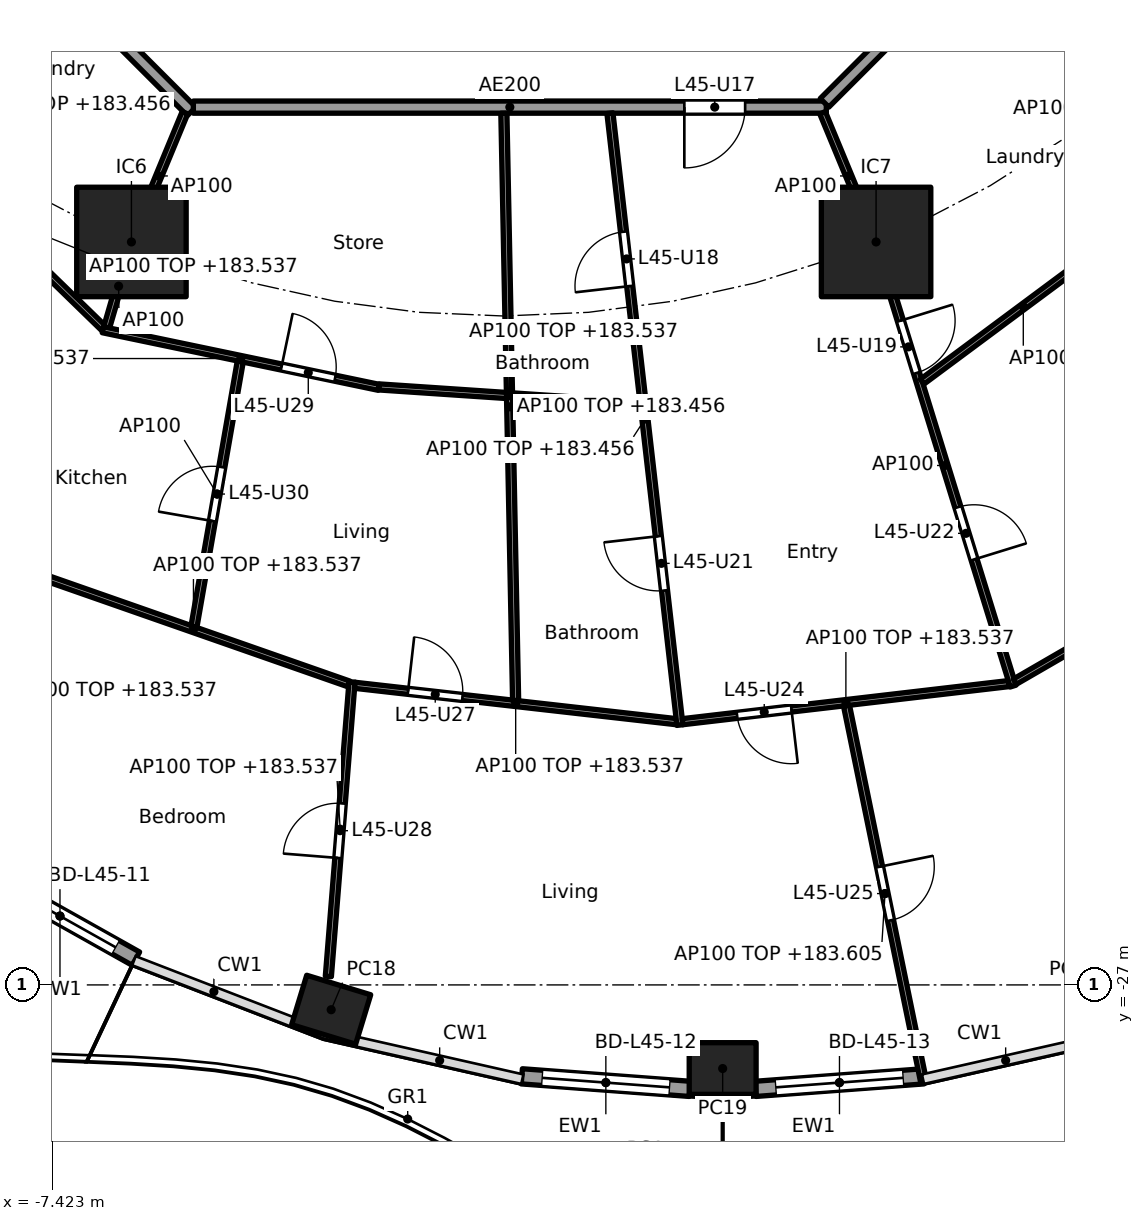
"""IFC4 building model, lengths in metres.
Left out: names, types, materials, properties, quantities, classifications, styles, units other than length and angle.
Written with IfcOpenShell. Run it as: python <this file> out.ifc"""

import sys

from ifc_helpers import new_model, si_unit, direction, frame, frame_2d, origin, origin_2d, place, context, subcontext, project, spatial, rectangle, hollow_rectangle, extrude, element, fill, save


model = new_model("IFC4")
c1 = context("Model", 3, precision=1e-05, world=origin(), true_north=direction((0.0, 1.0)))
c2 = subcontext(c1, "Body", "Model", "MODEL_VIEW")
j1 = project(units=[si_unit("LENGTHUNIT", "METRE"), si_unit("PLANEANGLEUNIT", "RADIAN")], contexts=[c1])
p1 = place(None, origin())
s1 = spatial("IfcSite", under=j1, at=p1, CompositionType="ELEMENT")
p2 = place(p1, origin())
s2 = spatial("IfcBuilding", under=s1, at=p2, CompositionType="ELEMENT")
p3 = place(p2, frame((0.0, 0.0, 180.7)))
s3 = spatial("IfcBuildingStorey", under=s2, at=p3, CompositionType="ELEMENT", Elevation=180.7)
for number, where, z_axis, x_axis in (
    (1, (-2.838, -27.408, 0.0), (0.0, 0.0, 1.0), (0.957, -0.292, 0.0)),
    (2, (3.6, -28.375, 0.0), (0.0, 0.0, 1.0), (1.0, 0.0, 0.0)),
):
    element("IfcColumn", number, at=place(p3, frame(where, z_axis=z_axis, x_axis=x_axis)), inside=s3, PredefinedType="COLUMN", context=c2, shape_type="SweptSolid", body=[
        extrude(hollow_rectangle(XDim=1.1, YDim=0.85, WallThickness=0.036, at=origin_2d()), origin(), (0.0, 0.0, 1.0), 3.7),
    ])
for number, where, z_axis, x_axis in (
    (3, (-6.123, -14.782, 0.0), (0.0, 0.0, 1.0), (1.0, 0.0, 0.0)),
    (4, (6.123, -14.782, 0.0), (0.0, 0.0, 1.0), (1.0, 0.0, 0.0)),
):
    element("IfcColumn", number, at=place(p3, frame(where, z_axis=z_axis, x_axis=x_axis)), inside=s3, PredefinedType="COLUMN", context=c2, shape_type="SweptSolid", body=[
        extrude(rectangle(XDim=1.8, YDim=1.8, at=origin_2d()), origin(), (0.0, 0.0, 1.0), 3.7),
    ])
p4 = place(p3, frame((-6.049, -26.568, 0.0), z_axis=(0.0, 0.0, 1.0), x_axis=(-0.872078262455, 0.489366431371, 0.0)))
e5 = element("IfcWall", 5, at=p4, inside=s3, PredefinedType="SOLIDWALL", context=c2, shape_type="SweptSolid", body=[
    extrude(rectangle(XDim=2.864, YDim=0.25, at=frame_2d((1.432, 0.0))), origin(), (0.0, 0.0, 1.0), 3.44),
])
p5 = place(p4, frame((0.382, 0.0, 0.0)))
e6 = element("IfcOpeningElement", 6, at=p5, cuts=e5, PredefinedType="OPENING", context=c2, shape_type="SweptSolid", body=[
    extrude(rectangle(XDim=2.1, YDim=2.4, at=frame_2d((1.05, 1.2))), frame((0.0, 0.135, 0.0), z_axis=(0.0, -1.0, 0.0), x_axis=(1.0, 0.0, 0.0)), (0.0, 0.0, 1.0), 0.27),
])
p6 = place(p3, frame((3.061, -28.709, 0.0), z_axis=(0.0, 0.0, 1.0), x_axis=(-0.997232064422, 0.074351931305, 0.0)))
e7 = element("IfcWall", 7, at=p6, inside=s3, PredefinedType="SOLIDWALL", context=c2, shape_type="SweptSolid", body=[
    extrude(rectangle(XDim=2.771, YDim=0.25, at=frame_2d((1.386, 0.0))), origin(), (0.0, 0.0, 1.0), 3.44),
])
p7 = place(p6, frame((0.336, 0.0, 0.0)))
e8 = element("IfcOpeningElement", 8, at=p7, cuts=e7, PredefinedType="OPENING", context=c2, shape_type="SweptSolid", body=[
    extrude(rectangle(XDim=2.1, YDim=2.4, at=frame_2d((1.05, 1.2))), frame((0.0, 0.135, 0.0), z_axis=(0.0, -1.0, 0.0), x_axis=(1.0, 0.0, 0.0)), (0.0, 0.0, 1.0), 0.27),
])
p8 = place(p3, frame((6.903, -28.503, 0.0), z_axis=(0.0, 0.0, 1.0), x_axis=(-0.997232064422, -0.074351931305, 0.0)))
e9 = element("IfcWall", 9, at=p8, inside=s3, PredefinedType="SOLIDWALL", context=c2, shape_type="SweptSolid", body=[
    extrude(rectangle(XDim=2.771, YDim=0.25, at=frame_2d((1.386, 0.0))), origin(), (0.0, 0.0, 1.0), 3.44),
])
p9 = place(p8, frame((0.336, 0.0, 0.0)))
e10 = element("IfcOpeningElement", 10, at=p9, cuts=e9, PredefinedType="OPENING", context=c2, shape_type="SweptSolid", body=[
    extrude(rectangle(XDim=2.1, YDim=2.4, at=frame_2d((1.05, 1.2))), frame((0.0, 0.135, 0.0), z_axis=(0.0, -1.0, 0.0), x_axis=(1.0, 0.0, 0.0)), (0.0, 0.0, 1.0), 0.27),
])
p10 = place(p3, frame((-12.635, -5.134, 0.0), z_axis=(0.0, 0.0, 1.0), x_axis=(0.707106781187, -0.707106781187, 0.0)))
e11 = element("IfcWall", 11, at=p10, inside=s3, PredefinedType="PARTITIONING", context=c2, shape_type="SweptSolid", body=[
    extrude(rectangle(XDim=10.609, YDim=0.2, at=frame_2d((5.305, 0.0))), origin(), (0.0, 0.0, 1.0), 3.44),
])
p11 = place(p3, frame((-5.104, -12.565, 0.0), z_axis=(0.0, 0.0, 1.0), x_axis=(1.0, 0.0, 0.0)))
e12 = element("IfcWall", 12, at=p11, inside=s3, PredefinedType="PARTITIONING", context=c2, shape_type="SweptSolid", body=[
    extrude(rectangle(XDim=10.409, YDim=0.2, at=frame_2d((5.205, 0.0))), origin(), (0.0, 0.0, 1.0), 3.44),
])
p12 = place(p11, frame((8.074, 0.0, 0.0)))
e13 = element("IfcOpeningElement", 13, at=p12, cuts=e12, PredefinedType="OPENING", context=c2, shape_type="SweptSolid", body=[
    extrude(rectangle(XDim=1.0, YDim=2.1, at=frame_2d((0.5, 1.05))), frame((0.0, 0.11, 0.0), z_axis=(0.0, -1.0, 0.0), x_axis=(1.0, 0.0, 0.0)), (0.0, 0.0, 1.0), 0.22),
])
p13 = place(p3, frame((5.275, -12.494, 0.0), z_axis=(0.0, 0.0, 1.0), x_axis=(0.707106781187, 0.707106781187, 0.0)))
e14 = element("IfcWall", 14, at=p13, inside=s3, PredefinedType="PARTITIONING", context=c2, shape_type="SweptSolid", body=[
    extrude(rectangle(XDim=10.409, YDim=0.2, at=frame_2d((5.205, 0.0))), origin(), (0.0, 0.0, 1.0), 3.44),
])
p14 = place(p3, frame((-9.627, -13.238, 0.0), z_axis=(0.0, 0.0, 1.0), x_axis=(0.716946269374, -0.697128429223, 0.0)))
e15 = element("IfcWall", 15, at=p14, inside=s3, PredefinedType="PARTITIONING", context=c2, shape_type="SweptSolid", body=[
    extrude(rectangle(XDim=4.25, YDim=0.1, at=frame_2d((2.125, 0.0))), origin(), (0.0, 0.0, 1.0), 2.837),
])
p15 = place(p14, frame((1.145, 0.0, 0.0)))
e16 = element("IfcOpeningElement", 16, at=p15, cuts=e15, PredefinedType="OPENING", context=c2, shape_type="SweptSolid", body=[
    extrude(rectangle(XDim=0.9, YDim=2.1, at=frame_2d((0.45, 1.05))), frame((0.0, 0.06, 0.0), z_axis=(0.0, -1.0, 0.0), x_axis=(1.0, 0.0, 0.0)), (0.0, 0.0, 1.0), 0.12),
])
p16 = place(p3, frame((-5.243, -12.657, 0.0), z_axis=(0.0, 0.0, 1.0), x_axis=(-0.382719158442, -0.923864733477, 0.0)))
e17 = element("IfcWall", 17, at=p16, inside=s3, PredefinedType="PARTITIONING", context=c2, shape_type="SweptSolid", body=[
    extrude(rectangle(XDim=2.25, YDim=0.1, at=frame_2d((1.125, 0.0))), origin(), (0.0, 0.0, 1.0), 3.44),
])
p17 = place(p3, frame((-6.137, -14.831, 0.0), z_axis=(0.0, 0.0, 1.0), x_axis=(-0.2785069197, -0.960434222464, 0.0)))
e18 = element("IfcWall", 18, at=p17, inside=s3, PredefinedType="PARTITIONING", context=c2, shape_type="SweptSolid", body=[
    extrude(rectangle(XDim=1.413, YDim=0.1, at=frame_2d((0.707, 0.0))), origin(), (0.0, 0.0, 1.0), 3.44),
])
p18 = place(p3, frame((-6.594, -16.226, 0.0), z_axis=(0.0, 0.0, 1.0), x_axis=(0.978899284405, -0.204343316484, 0.0)))
e19 = element("IfcWall", 19, at=p18, inside=s3, PredefinedType="PARTITIONING", context=c2, shape_type="SweptSolid", body=[
    extrude(rectangle(XDim=4.636, YDim=0.1, at=frame_2d((2.318, 0.0))), origin(), (0.0, 0.0, 1.0), 2.837),
])
p19 = place(p18, frame((3.002, 0.0, 0.0)))
e20 = element("IfcOpeningElement", 20, at=p19, cuts=e19, PredefinedType="OPENING", context=c2, shape_type="SweptSolid", body=[
    extrude(rectangle(XDim=0.9, YDim=2.1, at=frame_2d((0.45, 1.05))), frame((0.0, 0.06, 0.0), z_axis=(0.0, -1.0, 0.0), x_axis=(1.0, 0.0, 0.0)), (0.0, 0.0, 1.0), 0.12),
])
p20 = place(p3, frame((-7.66, -20.262, 0.0), z_axis=(0.0, 0.0, 1.0), x_axis=(0.943911038661, -0.330199865375, 0.0)))
e21 = element("IfcWall", 21, at=p20, inside=s3, PredefinedType="PARTITIONING", context=c2, shape_type="SweptSolid", body=[
    extrude(rectangle(XDim=5.417, YDim=0.1, at=frame_2d((2.709, 0.0))), origin(), (0.0, 0.0, 1.0), 2.837),
])
p21 = place(p3, frame((-4.333, -16.749, 0.0), z_axis=(0.0, 0.0, 1.0), x_axis=(-0.172053721569, -0.985087568135, 0.0)))
e22 = element("IfcWall", 22, at=p21, inside=s3, PredefinedType="PARTITIONING", context=c2, shape_type="SweptSolid", body=[
    extrude(rectangle(XDim=4.424, YDim=0.1, at=frame_2d((2.212, 0.0))), origin(), (0.0, 0.0, 1.0), 3.44),
])
p22 = place(p21, frame((1.762, 0.0, 0.0)))
e23 = element("IfcOpeningElement", 23, at=p22, cuts=e22, PredefinedType="OPENING", context=c2, shape_type="SweptSolid", body=[
    extrude(rectangle(XDim=0.9, YDim=2.1, at=frame_2d((0.45, 1.05))), frame((0.0, 0.06, 0.0), z_axis=(0.0, -1.0, 0.0), x_axis=(1.0, 0.0, 0.0)), (0.0, 0.0, 1.0), 0.12),
])
p23 = place(p3, frame((-2.055, -17.166, 0.0), z_axis=(0.0, 0.0, 1.0), x_axis=(0.997754717554, -0.066974051687, 0.0)))
e24 = element("IfcWall", 24, at=p23, inside=s3, PredefinedType="PARTITIONING", context=c2, shape_type="SweptSolid", body=[
    extrude(rectangle(XDim=4.309, YDim=0.1, at=frame_2d((2.154, 0.0))), origin(), (0.0, 0.0, 1.0), 2.837),
])
p24 = place(p3, frame((-2.495, -22.017, 0.0), z_axis=(0.0, 0.0, 1.0), x_axis=(-0.080150660566, -0.99678276049, 0.0)))
e25 = element("IfcWall", 25, at=p24, inside=s3, PredefinedType="PARTITIONING", context=c2, shape_type="SweptSolid", body=[
    extrude(rectangle(XDim=4.858, YDim=0.1, at=frame_2d((2.429, 0.0))), origin(), (0.0, 0.0, 1.0), 2.837),
])
p25 = place(p24, frame((2.004, 0.0, 0.0)))
e26 = element("IfcOpeningElement", 26, at=p25, cuts=e25, PredefinedType="OPENING", context=c2, shape_type="SweptSolid", body=[
    extrude(rectangle(XDim=0.9, YDim=2.1, at=frame_2d((0.45, 1.05))), frame((0.0, 0.06, 0.0), z_axis=(0.0, -1.0, 0.0), x_axis=(1.0, 0.0, 0.0)), (0.0, 0.0, 1.0), 0.12),
])
p26 = place(p3, frame((-2.449, -22.073, 0.0), z_axis=(0.0, 0.0, 1.0), x_axis=(0.993660315081, -0.112424099879, 0.0)))
e27 = element("IfcWall", 27, at=p26, inside=s3, PredefinedType="PARTITIONING", context=c2, shape_type="SweptSolid", body=[
    extrude(rectangle(XDim=5.325, YDim=0.1, at=frame_2d((2.662, 0.0))), origin(), (0.0, 0.0, 1.0), 2.837),
])
p27 = place(p26, frame((0.881, 0.0, 0.0)))
e28 = element("IfcOpeningElement", 28, at=p27, cuts=e27, PredefinedType="OPENING", context=c2, shape_type="SweptSolid", body=[
    extrude(rectangle(XDim=0.9, YDim=2.1, at=frame_2d((0.45, 1.05))), frame((0.0, 0.06, 0.0), z_axis=(0.0, -1.0, 0.0), x_axis=(1.0, 0.0, 0.0)), (0.0, 0.0, 1.0), 0.12),
])
p28 = place(p3, frame((0.002, -12.665, 0.0), z_axis=(0.0, 0.0, 1.0), x_axis=(0.019992969345, -0.999800120613, 0.0)))
e29 = element("IfcWall", 29, at=p28, inside=s3, PredefinedType="PARTITIONING", context=c2, shape_type="SweptSolid", body=[
    extrude(rectangle(XDim=9.659, YDim=0.1, at=frame_2d((4.83, 0.0))), origin(), (0.0, 0.0, 1.0), 2.756),
])
p29 = place(p3, frame((1.746, -12.664, 0.0), z_axis=(0.0, 0.0, 1.0), x_axis=(0.113629529561, -0.993523190475, 0.0)))
e30 = element("IfcWall", 30, at=p29, inside=s3, PredefinedType="PARTITIONING", context=c2, shape_type="SweptSolid", body=[
    extrude(rectangle(XDim=10.128, YDim=0.1, at=frame_2d((5.064, 0.0))), origin(), (0.0, 0.0, 1.0), 2.756),
])
p30 = place(p29, frame((1.962, 0.0, 0.0)))
e31 = element("IfcOpeningElement", 31, at=p30, cuts=e30, PredefinedType="OPENING", context=c2, shape_type="SweptSolid", body=[
    extrude(rectangle(XDim=0.9, YDim=2.1, at=frame_2d((0.45, 1.05))), frame((0.0, 0.06, 0.0), z_axis=(0.0, -1.0, 0.0), x_axis=(1.0, 0.0, 0.0)), (0.0, 0.0, 1.0), 0.12),
])
p31 = place(p29, frame((7.002, 0.0, 0.0)))
e32 = element("IfcOpeningElement", 32, at=p31, cuts=e30, PredefinedType="OPENING", context=c2, shape_type="SweptSolid", body=[
    extrude(rectangle(XDim=0.9, YDim=2.1, at=frame_2d((0.45, 1.05))), frame((0.0, 0.06, 0.0), z_axis=(0.0, -1.0, 0.0), x_axis=(1.0, 0.0, 0.0)), (0.0, 0.0, 1.0), 0.12),
])
p32 = place(p3, frame((2.941, -22.671, 0.0), z_axis=(0.0, 0.0, 1.0), x_axis=(0.993245806382, 0.1160291692, 0.0)))
e33 = element("IfcWall", 33, at=p32, inside=s3, PredefinedType="PARTITIONING", context=c2, shape_type="SweptSolid", body=[
    extrude(rectangle(XDim=5.408, YDim=0.1, at=frame_2d((2.704, 0.0))), origin(), (0.0, 0.0, 1.0), 2.837),
])
p33 = place(p32, frame((0.902, 0.0, 0.0)))
e34 = element("IfcOpeningElement", 34, at=p33, cuts=e33, PredefinedType="OPENING", context=c2, shape_type="SweptSolid", body=[
    extrude(rectangle(XDim=0.9, YDim=2.1, at=frame_2d((0.45, 1.05))), frame((0.0, 0.06, 0.0), z_axis=(0.0, -1.0, 0.0), x_axis=(1.0, 0.0, 0.0)), (0.0, 0.0, 1.0), 0.12),
])
p34 = place(p3, frame((5.636, -22.407, 0.0), z_axis=(0.0, 0.0, 1.0), x_axis=(0.200860375092, -0.979619880218, 0.0)))
e35 = element("IfcWall", 35, at=p34, inside=s3, PredefinedType="PARTITIONING", context=c2, shape_type="SweptSolid", body=[
    extrude(rectangle(XDim=6.311, YDim=0.1, at=frame_2d((3.155, 0.0))), origin(), (0.0, 0.0, 1.0), 2.905),
])
p35 = place(p34, frame((2.705, 0.0, 0.0)))
e36 = element("IfcOpeningElement", 36, at=p35, cuts=e35, PredefinedType="OPENING", context=c2, shape_type="SweptSolid", body=[
    extrude(rectangle(XDim=0.9, YDim=2.1, at=frame_2d((0.45, 1.05))), frame((0.0, 0.06, 0.0), z_axis=(0.0, -1.0, 0.0), x_axis=(1.0, 0.0, 0.0)), (0.0, 0.0, 1.0), 0.12),
])
p36 = place(p3, frame((5.243, -12.657, 0.0), z_axis=(0.0, 0.0, 1.0), x_axis=(0.382719158442, -0.923864733477, 0.0)))
e37 = element("IfcWall", 37, at=p36, inside=s3, PredefinedType="PARTITIONING", context=c2, shape_type="SweptSolid", body=[
    extrude(rectangle(XDim=2.25, YDim=0.1, at=frame_2d((1.125, 0.0))), origin(), (0.0, 0.0, 1.0), 3.44),
])
p37 = place(p3, frame((6.138, -14.83, 0.0), z_axis=(0.0, 0.0, 1.0), x_axis=(0.294822274121, -0.955552105687, 0.0)))
e38 = element("IfcWall", 38, at=p37, inside=s3, PredefinedType="PARTITIONING", context=c2, shape_type="SweptSolid", body=[
    extrude(rectangle(XDim=7.594, YDim=0.1, at=frame_2d((3.797, 0.0))), origin(), (0.0, 0.0, 1.0), 3.44),
])
p38 = place(p37, frame((1.306, 0.0, 0.0)))
e39 = element("IfcOpeningElement", 39, at=p38, cuts=e38, PredefinedType="OPENING", context=c2, shape_type="SweptSolid", body=[
    extrude(rectangle(XDim=0.9, YDim=2.1, at=frame_2d((0.45, 1.05))), frame((0.0, 0.06, 0.0), z_axis=(0.0, -1.0, 0.0), x_axis=(1.0, 0.0, 0.0)), (0.0, 0.0, 1.0), 0.12),
])
p39 = place(p37, frame((4.515, 0.0, 0.0)))
e40 = element("IfcOpeningElement", 40, at=p39, cuts=e38, PredefinedType="OPENING", context=c2, shape_type="SweptSolid", body=[
    extrude(rectangle(XDim=0.9, YDim=2.1, at=frame_2d((0.45, 1.05))), frame((0.0, 0.06, 0.0), z_axis=(0.0, -1.0, 0.0), x_axis=(1.0, 0.0, 0.0)), (0.0, 0.0, 1.0), 0.12),
])
p40 = place(p3, frame((6.881, -17.08, 0.0), z_axis=(0.0, 0.0, 1.0), x_axis=(0.802784956441, 0.596268659005, 0.0)))
e41 = element("IfcWall", 41, at=p40, inside=s3, PredefinedType="PARTITIONING", context=c2, shape_type="SweptSolid", body=[
    extrude(rectangle(XDim=4.142, YDim=0.1, at=frame_2d((2.071, 0.0))), origin(), (0.0, 0.0, 1.0), 2.837),
])
p41 = place(p3, frame((8.405, -22.013, 0.0), z_axis=(0.0, 0.0, 1.0), x_axis=(0.865277177388, 0.501293732547, 0.0)))
e42 = element("IfcWall", 42, at=p41, inside=s3, PredefinedType="PARTITIONING", context=c2, shape_type="SweptSolid", body=[
    extrude(rectangle(XDim=5.27, YDim=0.1, at=frame_2d((2.635, 0.0))), origin(), (0.0, 0.0, 1.0), 2.837),
])
p42 = place(p3, frame((8.943, -8.966, 0.0), z_axis=(0.0, 0.0, 1.0), x_axis=(0.587187896734, -0.809450661825, 0.0)))
e43 = element("IfcWall", 43, at=p42, inside=s3, PredefinedType="PARTITIONING", context=c2, shape_type="SweptSolid", body=[
    extrude(rectangle(XDim=4.975, YDim=0.1, at=frame_2d((2.487, 0.0))), origin(), (0.0, 0.0, 1.0), 2.756),
])
p43 = place(p42, frame((2.037, 0.0, 0.0)))
e44 = element("IfcOpeningElement", 44, at=p43, cuts=e43, PredefinedType="OPENING", context=c2, shape_type="SweptSolid", body=[
    extrude(rectangle(XDim=0.9, YDim=2.1, at=frame_2d((0.45, 1.05))), frame((0.0, 0.06, 0.0), z_axis=(0.0, -1.0, 0.0), x_axis=(1.0, 0.0, 0.0)), (0.0, 0.0, 1.0), 0.12),
])
p44 = place(p5, origin())
e45 = element("IfcDoor", 45, at=p44, inside=s3, OperationType="SLIDING_TO_LEFT", PredefinedType="DOOR", context=c2, shape_type="SweptSolid", body=[
    extrude(rectangle(XDim=2.1, YDim=2.4, at=frame_2d((1.05, 1.2))), frame((0.0, 0.025, 0.0), z_axis=(0.0, -1.0, 0.0), x_axis=(1.0, 0.0, 0.0)), (0.0, 0.0, 1.0), 0.05),
])
fill(e6, e45)
p45 = place(p7, origin())
e46 = element("IfcDoor", 46, at=p45, inside=s3, OperationType="SLIDING_TO_LEFT", PredefinedType="DOOR", context=c2, shape_type="SweptSolid", body=[
    extrude(rectangle(XDim=2.1, YDim=2.4, at=frame_2d((1.05, 1.2))), frame((0.0, 0.025, 0.0), z_axis=(0.0, -1.0, 0.0), x_axis=(1.0, 0.0, 0.0)), (0.0, 0.0, 1.0), 0.05),
])
fill(e8, e46)
p46 = place(p9, origin())
e47 = element("IfcDoor", 47, at=p46, inside=s3, OperationType="SLIDING_TO_LEFT", PredefinedType="DOOR", context=c2, shape_type="SweptSolid", body=[
    extrude(rectangle(XDim=2.1, YDim=2.4, at=frame_2d((1.05, 1.2))), frame((0.0, 0.025, 0.0), z_axis=(0.0, -1.0, 0.0), x_axis=(1.0, 0.0, 0.0)), (0.0, 0.0, 1.0), 0.05),
])
fill(e10, e47)
p47 = place(p12, frame((1.0, 0.0, 0.0), x_axis=(-1.0, 0.0, 0.0)))
e48 = element("IfcDoor", 48, at=p47, inside=s3, OperationType="SINGLE_SWING_RIGHT", PredefinedType="DOOR", context=c2, shape_type="SweptSolid", body=[
    extrude(rectangle(XDim=1.0, YDim=2.1, at=frame_2d((0.5, 1.05))), frame((0.0, 0.025, 0.0), z_axis=(0.0, -1.0, 0.0), x_axis=(1.0, 0.0, 0.0)), (0.0, 0.0, 1.0), 0.05),
])
fill(e13, e48)
p48 = place(p30, frame((0.9, 0.0, 0.0), x_axis=(-1.0, 0.0, 0.0)))
e49 = element("IfcDoor", 49, at=p48, inside=s3, OperationType="SINGLE_SWING_LEFT", PredefinedType="DOOR", context=c2, shape_type="SweptSolid", body=[
    extrude(rectangle(XDim=0.9, YDim=2.1, at=frame_2d((0.45, 1.05))), frame((0.0, 0.025, 0.0), z_axis=(0.0, -1.0, 0.0), x_axis=(1.0, 0.0, 0.0)), (0.0, 0.0, 1.0), 0.05),
])
fill(e31, e49)
p49 = place(p38, origin())
e50 = element("IfcDoor", 50, at=p49, inside=s3, OperationType="SINGLE_SWING_LEFT", PredefinedType="DOOR", context=c2, shape_type="SweptSolid", body=[
    extrude(rectangle(XDim=0.9, YDim=2.1, at=frame_2d((0.45, 1.05))), frame((0.0, 0.025, 0.0), z_axis=(0.0, -1.0, 0.0), x_axis=(1.0, 0.0, 0.0)), (0.0, 0.0, 1.0), 0.05),
])
fill(e39, e50)
p50 = place(p31, frame((0.9, 0.0, 0.0), x_axis=(-1.0, 0.0, 0.0)))
e51 = element("IfcDoor", 51, at=p50, inside=s3, OperationType="SINGLE_SWING_RIGHT", PredefinedType="DOOR", context=c2, shape_type="SweptSolid", body=[
    extrude(rectangle(XDim=0.9, YDim=2.1, at=frame_2d((0.45, 1.05))), frame((0.0, 0.025, 0.0), z_axis=(0.0, -1.0, 0.0), x_axis=(1.0, 0.0, 0.0)), (0.0, 0.0, 1.0), 0.05),
])
fill(e32, e51)
p51 = place(p39, origin())
e52 = element("IfcDoor", 52, at=p51, inside=s3, OperationType="SINGLE_SWING_RIGHT", PredefinedType="DOOR", context=c2, shape_type="SweptSolid", body=[
    extrude(rectangle(XDim=0.9, YDim=2.1, at=frame_2d((0.45, 1.05))), frame((0.0, 0.025, 0.0), z_axis=(0.0, -1.0, 0.0), x_axis=(1.0, 0.0, 0.0)), (0.0, 0.0, 1.0), 0.05),
])
fill(e40, e52)
p52 = place(p33, frame((0.9, 0.0, 0.0), x_axis=(-1.0, 0.0, 0.0)))
e53 = element("IfcDoor", 53, at=p52, inside=s3, OperationType="SINGLE_SWING_LEFT", PredefinedType="DOOR", context=c2, shape_type="SweptSolid", body=[
    extrude(rectangle(XDim=0.9, YDim=2.1, at=frame_2d((0.45, 1.05))), frame((0.0, 0.025, 0.0), z_axis=(0.0, -1.0, 0.0), x_axis=(1.0, 0.0, 0.0)), (0.0, 0.0, 1.0), 0.05),
])
fill(e34, e53)
p53 = place(p35, origin())
e54 = element("IfcDoor", 54, at=p53, inside=s3, OperationType="SINGLE_SWING_LEFT", PredefinedType="DOOR", context=c2, shape_type="SweptSolid", body=[
    extrude(rectangle(XDim=0.9, YDim=2.1, at=frame_2d((0.45, 1.05))), frame((0.0, 0.025, 0.0), z_axis=(0.0, -1.0, 0.0), x_axis=(1.0, 0.0, 0.0)), (0.0, 0.0, 1.0), 0.05),
])
fill(e36, e54)
p54 = place(p27, origin())
e55 = element("IfcDoor", 55, at=p54, inside=s3, OperationType="SINGLE_SWING_LEFT", PredefinedType="DOOR", context=c2, shape_type="SweptSolid", body=[
    extrude(rectangle(XDim=0.9, YDim=2.1, at=frame_2d((0.45, 1.05))), frame((0.0, 0.025, 0.0), z_axis=(0.0, -1.0, 0.0), x_axis=(1.0, 0.0, 0.0)), (0.0, 0.0, 1.0), 0.05),
])
fill(e28, e55)
p55 = place(p25, frame((0.9, 0.0, 0.0), x_axis=(-1.0, 0.0, 0.0)))
e56 = element("IfcDoor", 56, at=p55, inside=s3, OperationType="SINGLE_SWING_LEFT", PredefinedType="DOOR", context=c2, shape_type="SweptSolid", body=[
    extrude(rectangle(XDim=0.9, YDim=2.1, at=frame_2d((0.45, 1.05))), frame((0.0, 0.025, 0.0), z_axis=(0.0, -1.0, 0.0), x_axis=(1.0, 0.0, 0.0)), (0.0, 0.0, 1.0), 0.05),
])
fill(e26, e56)
p56 = place(p19, origin())
e57 = element("IfcDoor", 57, at=p56, inside=s3, OperationType="SINGLE_SWING_LEFT", PredefinedType="DOOR", context=c2, shape_type="SweptSolid", body=[
    extrude(rectangle(XDim=0.9, YDim=2.1, at=frame_2d((0.45, 1.05))), frame((0.0, 0.025, 0.0), z_axis=(0.0, -1.0, 0.0), x_axis=(1.0, 0.0, 0.0)), (0.0, 0.0, 1.0), 0.05),
])
fill(e20, e57)
p57 = place(p22, frame((0.9, 0.0, 0.0), x_axis=(-1.0, 0.0, 0.0)))
e58 = element("IfcDoor", 58, at=p57, inside=s3, OperationType="SINGLE_SWING_LEFT", PredefinedType="DOOR", context=c2, shape_type="SweptSolid", body=[
    extrude(rectangle(XDim=0.9, YDim=2.1, at=frame_2d((0.45, 1.05))), frame((0.0, 0.025, 0.0), z_axis=(0.0, -1.0, 0.0), x_axis=(1.0, 0.0, 0.0)), (0.0, 0.0, 1.0), 0.05),
])
fill(e23, e58)
save(model, sys.argv[1])
